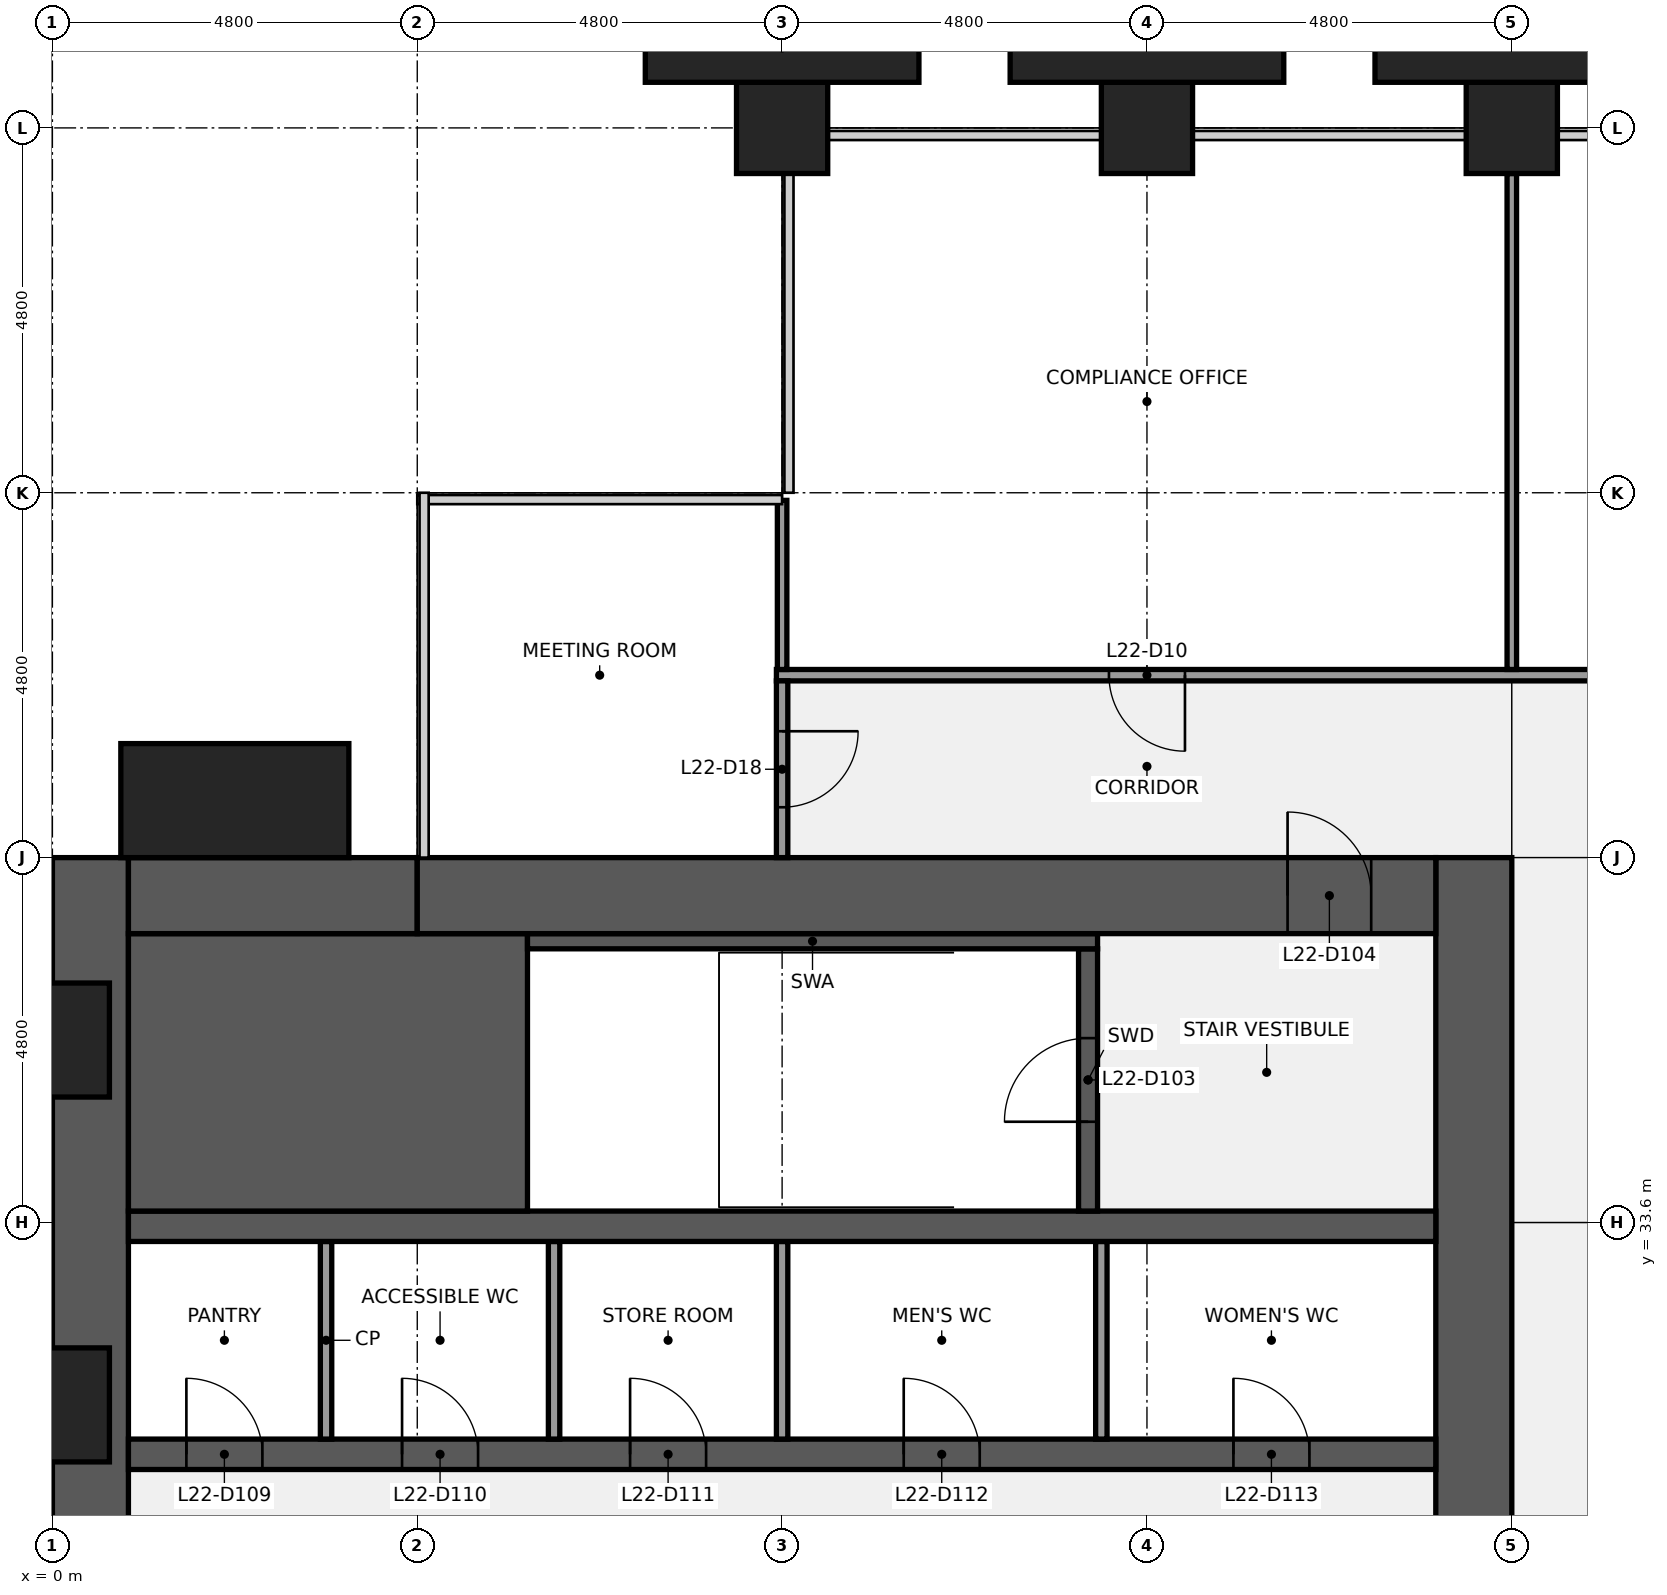
"""IFC4 building model, lengths in metres.
Left out: names, types, materials, properties, quantities, classifications, styles, units other than length and angle.
Written with IfcOpenShell. Run it as: python <this file> out.ifc"""

import sys

from ifc_helpers import new_model, si_unit, direction, frame, frame_2d, origin, origin_2d, place, context, subcontext, project, spatial, rectangle, extrude, element, fill, save


model = new_model("IFC4")
c1 = context("Model", 3, precision=1e-05, world=origin(), true_north=direction((0.0, 1.0)))
c2 = subcontext(c1, "Body", "Model", "MODEL_VIEW")
j1 = project(units=[si_unit("LENGTHUNIT", "METRE"), si_unit("PLANEANGLEUNIT", "RADIAN")], contexts=[c1])
p1 = place(None, origin())
s1 = spatial("IfcSite", under=j1, at=p1, CompositionType="ELEMENT")
p2 = place(p1, origin())
s2 = spatial("IfcBuilding", under=s1, at=p2, CompositionType="ELEMENT")
p3 = place(p2, frame((0.0, 0.0, 108.1)))
s3 = spatial("IfcBuildingStorey", under=s2, at=p3, CompositionType="ELEMENT", Elevation=108.1)
for number, where, z_axis, x_axis in (
    (1, (9.6, 48.0, 0.0), (0.0, 0.0, 1.0), (1.0, 0.0, 0.0)),
    (2, (14.4, 48.0, 0.0), (0.0, 0.0, 1.0), (1.0, 0.0, 0.0)),
    (3, (19.2, 48.0, 0.0), (0.0, 0.0, 1.0), (1.0, 0.0, 0.0)),
):
    element("IfcColumn", number, at=place(p3, frame(where, z_axis=z_axis, x_axis=x_axis)), inside=s3, PredefinedType="COLUMN", context=c2, shape_type="SweptSolid", body=[
        extrude(rectangle(XDim=1.2, YDim=1.2, at=origin_2d()), origin(), (0.0, 0.0, 1.0), 4.0),
    ])
p4 = place(p3, frame((0.5, 9.6, 0.0), z_axis=(0.0, 0.0, 1.0), x_axis=(0.0, 1.0, 0.0)))
e4 = element("IfcWall", 4, at=p4, inside=s3, PredefinedType="SHEAR", context=c2, shape_type="SweptSolid", body=[
    extrude(rectangle(XDim=28.8, YDim=1.0, at=frame_2d((14.4, 0.0))), origin(), (0.0, 0.0, 1.0), 3.84),
])
p5 = place(p4, frame((8.85, 0.0, 0.9)))
e5 = element("IfcOpeningElement", 5, at=p5, cuts=e4, PredefinedType="OPENING", context=c2, shape_type="SweptSolid", body=[
    extrude(rectangle(XDim=1.5, YDim=1.5, at=frame_2d((0.75, 0.75))), frame((0.0, 0.51, 0.0), z_axis=(0.0, -1.0, 0.0), x_axis=(1.0, 0.0, 0.0)), (0.0, 0.0, 1.0), 1.02),
])
p6 = place(p4, frame((18.45, 0.0, 0.9)))
e6 = element("IfcOpeningElement", 6, at=p6, cuts=e4, PredefinedType="OPENING", context=c2, shape_type="SweptSolid", body=[
    extrude(rectangle(XDim=1.5, YDim=1.5, at=frame_2d((0.75, 0.75))), frame((0.0, 0.51, 0.0), z_axis=(0.0, -1.0, 0.0), x_axis=(1.0, 0.0, 0.0)), (0.0, 0.0, 1.0), 1.02),
])
p7 = place(p3, frame((18.7, 38.4, 0.0), z_axis=(0.0, 0.0, 1.0), x_axis=(0.0, -1.0, 0.0)))
e7 = element("IfcWall", 7, at=p7, inside=s3, PredefinedType="SHEAR", context=c2, shape_type="SweptSolid", body=[
    extrude(rectangle(XDim=28.8, YDim=1.0, at=frame_2d((14.4, 0.0))), origin(), (0.0, 0.0, 1.0), 3.84),
])
p8 = place(p7, frame((18.3, 0.0, 0.0)))
e8 = element("IfcOpeningElement", 8, at=p8, cuts=e7, PredefinedType="OPENING", context=c2, shape_type="SweptSolid", body=[
    extrude(rectangle(XDim=1.8, YDim=2.1, at=frame_2d((0.9, 1.05))), frame((0.0, 0.51, 0.0), z_axis=(0.0, -1.0, 0.0), x_axis=(1.0, 0.0, 0.0)), (0.0, 0.0, 1.0), 1.02),
])
p9 = place(p7, frame((8.7, 0.0, 0.0)))
e9 = element("IfcOpeningElement", 9, at=p9, cuts=e7, PredefinedType="OPENING", context=c2, shape_type="SweptSolid", body=[
    extrude(rectangle(XDim=1.8, YDim=2.1, at=frame_2d((0.9, 1.05))), frame((0.0, 0.51, 0.0), z_axis=(0.0, -1.0, 0.0), x_axis=(1.0, 0.0, 0.0)), (0.0, 0.0, 1.0), 1.02),
])
p10 = place(p3, frame((1.0, 30.55, 0.0), z_axis=(0.0, 0.0, 1.0), x_axis=(1.0, 0.0, 0.0)))
e10 = element("IfcWall", 10, at=p10, inside=s3, PredefinedType="SHEAR", context=c2, shape_type="SweptSolid", body=[
    extrude(rectangle(XDim=17.2, YDim=0.4, at=frame_2d((8.6, 0.0))), origin(), (0.0, 0.0, 1.0), 3.84),
])
p11 = place(p10, frame((0.762, 0.0, 0.0)))
e11 = element("IfcOpeningElement", 11, at=p11, cuts=e10, PredefinedType="OPENING", context=c2, shape_type="SweptSolid", body=[
    extrude(rectangle(XDim=1.0, YDim=2.1, at=frame_2d((0.5, 1.05))), frame((0.0, 0.21, 0.0), z_axis=(0.0, -1.0, 0.0), x_axis=(1.0, 0.0, 0.0)), (0.0, 0.0, 1.0), 0.42),
])
p12 = place(p10, frame((3.6, 0.0, 0.0)))
e12 = element("IfcOpeningElement", 12, at=p12, cuts=e10, PredefinedType="OPENING", context=c2, shape_type="SweptSolid", body=[
    extrude(rectangle(XDim=1.0, YDim=2.1, at=frame_2d((0.5, 1.05))), frame((0.0, 0.21, 0.0), z_axis=(0.0, -1.0, 0.0), x_axis=(1.0, 0.0, 0.0)), (0.0, 0.0, 1.0), 0.42),
])
p13 = place(p10, frame((6.6, 0.0, 0.0)))
e13 = element("IfcOpeningElement", 13, at=p13, cuts=e10, PredefinedType="OPENING", context=c2, shape_type="SweptSolid", body=[
    extrude(rectangle(XDim=1.0, YDim=2.1, at=frame_2d((0.5, 1.05))), frame((0.0, 0.21, 0.0), z_axis=(0.0, -1.0, 0.0), x_axis=(1.0, 0.0, 0.0)), (0.0, 0.0, 1.0), 0.42),
])
p14 = place(p10, frame((10.2, 0.0, 0.0)))
e14 = element("IfcOpeningElement", 14, at=p14, cuts=e10, PredefinedType="OPENING", context=c2, shape_type="SweptSolid", body=[
    extrude(rectangle(XDim=1.0, YDim=2.1, at=frame_2d((0.5, 1.05))), frame((0.0, 0.21, 0.0), z_axis=(0.0, -1.0, 0.0), x_axis=(1.0, 0.0, 0.0)), (0.0, 0.0, 1.0), 0.42),
])
p15 = place(p10, frame((14.538, 0.0, 0.0)))
e15 = element("IfcOpeningElement", 15, at=p15, cuts=e10, PredefinedType="OPENING", context=c2, shape_type="SweptSolid", body=[
    extrude(rectangle(XDim=1.0, YDim=2.1, at=frame_2d((0.5, 1.05))), frame((0.0, 0.21, 0.0), z_axis=(0.0, -1.0, 0.0), x_axis=(1.0, 0.0, 0.0)), (0.0, 0.0, 1.0), 0.42),
])
for number, where, z_axis, x_axis in (
    (16, (3.6, 30.75, 0.0), (0.0, 0.0, 1.0), (0.0, 1.0, 0.0)),
    (17, (6.6, 30.75, 0.0), (0.0, 0.0, 1.0), (0.0, 1.0, 0.0)),
    (18, (9.6, 30.75, 0.0), (0.0, 0.0, 1.0), (0.0, 1.0, 0.0)),
    (19, (13.8, 30.75, 0.0), (0.0, 0.0, 1.0), (0.0, 1.0, 0.0)),
):
    element("IfcWall", number, at=place(p3, frame(where, z_axis=z_axis, x_axis=x_axis)), inside=s3, PredefinedType="PARTITIONING", context=c2, shape_type="SweptSolid", body=[
        extrude(rectangle(XDim=2.6, YDim=0.15, at=frame_2d((1.3, 0.0))), origin(), (0.0, 0.0, 1.0), 3.84),
    ])
p16 = place(p3, frame((1.0, 33.55, 0.0), z_axis=(0.0, 0.0, 1.0), x_axis=(1.0, 0.0, 0.0)))
e20 = element("IfcWall", 20, at=p16, inside=s3, PredefinedType="SHEAR", context=c2, shape_type="SweptSolid", body=[
    extrude(rectangle(XDim=17.2, YDim=0.4, at=frame_2d((8.6, 0.0))), origin(), (0.0, 0.0, 1.0), 3.84),
])
p17 = place(p3, frame((1.0, 35.575, 0.0), z_axis=(0.0, 0.0, 1.0), x_axis=(1.0, 0.0, 0.0)))
e21 = element("IfcWall", 21, at=p17, inside=s3, PredefinedType="SHEAR", context=c2, shape_type="SweptSolid", body=[
    extrude(rectangle(XDim=5.25, YDim=3.65, at=frame_2d((2.625, 0.0))), origin(), (0.0, 0.0, 1.0), 3.84),
])
p18 = place(p3, frame((13.625, 33.75, 0.0), z_axis=(0.0, 0.0, 1.0), x_axis=(0.0, 1.0, 0.0)))
e22 = element("IfcWall", 22, at=p18, inside=s3, PredefinedType="SHEAR", context=c2, shape_type="SweptSolid", body=[
    extrude(rectangle(XDim=3.45, YDim=0.25, at=frame_2d((1.725, 0.0))), origin(), (0.0, 0.0, 1.0), 3.84),
])
p19 = place(p18, frame((1.175, 0.0, 0.0)))
e23 = element("IfcOpeningElement", 23, at=p19, cuts=e22, PredefinedType="OPENING", context=c2, shape_type="SweptSolid", body=[
    extrude(rectangle(XDim=1.1, YDim=2.1, at=frame_2d((0.55, 1.05))), frame((0.0, 0.135, 0.0), z_axis=(0.0, -1.0, 0.0), x_axis=(1.0, 0.0, 0.0)), (0.0, 0.0, 1.0), 0.27),
])
p20 = place(p3, frame((6.25, 37.3, 0.0), z_axis=(0.0, 0.0, 1.0), x_axis=(1.0, 0.0, 0.0)))
e24 = element("IfcWall", 24, at=p20, inside=s3, PredefinedType="SHEAR", context=c2, shape_type="SweptSolid", body=[
    extrude(rectangle(XDim=7.5, YDim=0.2, at=frame_2d((3.75, 0.0))), origin(), (0.0, 0.0, 1.0), 3.84),
])
p21 = place(p3, frame((1.0, 37.9, 0.0), z_axis=(0.0, 0.0, 1.0), x_axis=(1.0, 0.0, 0.0)))
e25 = element("IfcWall", 25, at=p21, inside=s3, PredefinedType="SHEAR", context=c2, shape_type="SweptSolid", body=[
    extrude(rectangle(XDim=3.8, YDim=1.0, at=frame_2d((1.9, 0.0))), origin(), (0.0, 0.0, 1.0), 3.84),
])
p22 = place(p3, frame((4.8, 37.9, 0.0), z_axis=(0.0, 0.0, 1.0), x_axis=(1.0, 0.0, 0.0)))
e26 = element("IfcWall", 26, at=p22, inside=s3, PredefinedType="SHEAR", context=c2, shape_type="SweptSolid", body=[
    extrude(rectangle(XDim=13.4, YDim=1.0, at=frame_2d((6.7, 0.0))), origin(), (0.0, 0.0, 1.0), 3.84),
])
p23 = place(p22, frame((11.45, 0.0, 0.0)))
e27 = element("IfcOpeningElement", 27, at=p23, cuts=e26, PredefinedType="OPENING", context=c2, shape_type="SweptSolid", body=[
    extrude(rectangle(XDim=1.1, YDim=2.1, at=frame_2d((0.55, 1.05))), frame((0.0, 0.51, 0.0), z_axis=(0.0, -1.0, 0.0), x_axis=(1.0, 0.0, 0.0)), (0.0, 0.0, 1.0), 1.02),
])
p24 = place(p3, frame((9.525, 40.8, 0.0), z_axis=(0.0, 0.0, 1.0), x_axis=(1.0, 0.0, 0.0)))
e28 = element("IfcWall", 28, at=p24, inside=s3, PredefinedType="PARTITIONING", context=c2, shape_type="SweptSolid", body=[
    extrude(rectangle(XDim=38.55, YDim=0.15, at=frame_2d((19.275, 0.0))), origin(), (0.0, 0.0, 1.0), 2.936),
])
p25 = place(p24, frame((4.375, 0.0, 0.0)))
e29 = element("IfcOpeningElement", 29, at=p25, cuts=e28, PredefinedType="OPENING", context=c2, shape_type="SweptSolid", body=[
    extrude(rectangle(XDim=1.0, YDim=2.1, at=frame_2d((0.5, 1.05))), frame((0.0, 0.085, 0.0), z_axis=(0.0, -1.0, 0.0), x_axis=(1.0, 0.0, 0.0)), (0.0, 0.0, 1.0), 0.17),
])
p26 = place(p24, frame((13.975, 0.0, 0.0)))
e30 = element("IfcOpeningElement", 30, at=p26, cuts=e28, PredefinedType="OPENING", context=c2, shape_type="SweptSolid", body=[
    extrude(rectangle(XDim=1.0, YDim=2.1, at=frame_2d((0.5, 1.05))), frame((0.0, 0.085, 0.0), z_axis=(0.0, -1.0, 0.0), x_axis=(1.0, 0.0, 0.0)), (0.0, 0.0, 1.0), 0.17),
])
p27 = place(p24, frame((19.975, 0.0, 0.0)))
e31 = element("IfcOpeningElement", 31, at=p27, cuts=e28, PredefinedType="OPENING", context=c2, shape_type="SweptSolid", body=[
    extrude(rectangle(XDim=1.0, YDim=2.1, at=frame_2d((0.5, 1.05))), frame((0.0, 0.085, 0.0), z_axis=(0.0, -1.0, 0.0), x_axis=(1.0, 0.0, 0.0)), (0.0, 0.0, 1.0), 0.17),
])
p28 = place(p24, frame((24.775, 0.0, 0.0)))
e32 = element("IfcOpeningElement", 32, at=p28, cuts=e28, PredefinedType="OPENING", context=c2, shape_type="SweptSolid", body=[
    extrude(rectangle(XDim=1.0, YDim=2.1, at=frame_2d((0.5, 1.05))), frame((0.0, 0.085, 0.0), z_axis=(0.0, -1.0, 0.0), x_axis=(1.0, 0.0, 0.0)), (0.0, 0.0, 1.0), 0.17),
])
p29 = place(p24, frame((33.175, 0.0, 0.0)))
e33 = element("IfcOpeningElement", 33, at=p29, cuts=e28, PredefinedType="OPENING", context=c2, shape_type="SweptSolid", body=[
    extrude(rectangle(XDim=1.0, YDim=2.1, at=frame_2d((0.5, 1.05))), frame((0.0, 0.085, 0.0), z_axis=(0.0, -1.0, 0.0), x_axis=(1.0, 0.0, 0.0)), (0.0, 0.0, 1.0), 0.17),
])
p30 = place(p3, frame((9.6, 40.875, 0.0), z_axis=(0.0, 0.0, 1.0), x_axis=(0.0, 1.0, 0.0)))
e34 = element("IfcWall", 34, at=p30, inside=s3, PredefinedType="PARTITIONING", context=c2, shape_type="SweptSolid", body=[
    extrude(rectangle(XDim=2.225, YDim=0.125, at=frame_2d((1.113, 0.0))), origin(), (0.0, 0.0, 1.0), 2.936),
])
p31 = place(p3, frame((9.6, 38.4, 0.0), z_axis=(0.0, 0.0, 1.0), x_axis=(0.0, 1.0, 0.0)))
e35 = element("IfcWall", 35, at=p31, inside=s3, PredefinedType="PARTITIONING", context=c2, shape_type="SweptSolid", body=[
    extrude(rectangle(XDim=2.325, YDim=0.15, at=frame_2d((1.163, 0.0))), origin(), (0.0, 0.0, 1.0), 2.936),
])
p32 = place(p31, frame((0.663, 0.0, 0.0)))
e36 = element("IfcOpeningElement", 36, at=p32, cuts=e35, PredefinedType="OPENING", context=c2, shape_type="SweptSolid", body=[
    extrude(rectangle(XDim=1.0, YDim=2.1, at=frame_2d((0.5, 1.05))), frame((0.0, 0.085, 0.0), z_axis=(0.0, -1.0, 0.0), x_axis=(1.0, 0.0, 0.0)), (0.0, 0.0, 1.0), 0.17),
])
p33 = place(p3, frame((19.2, 40.875, 0.0), z_axis=(0.0, 0.0, 1.0), x_axis=(0.0, 1.0, 0.0)))
e37 = element("IfcWall", 37, at=p33, inside=s3, PredefinedType="PARTITIONING", context=c2, shape_type="SweptSolid", body=[
    extrude(rectangle(XDim=6.525, YDim=0.125, at=frame_2d((3.262, 0.0))), origin(), (0.0, 0.0, 1.0), 2.936),
])
p34 = place(p3, frame((2.4, 39.15, 0.0), z_axis=(0.0, 0.0, 1.0), x_axis=(1.0, 0.0, 0.0)))
e38 = element("IfcColumn", 38, at=p34, inside=s3, PredefinedType="PILASTER", context=c2, shape_type="SweptSolid", body=[
    extrude(rectangle(XDim=3.0, YDim=1.5, at=origin_2d()), origin(), (0.0, 0.0, 1.0), 4.0),
])
for number, where, z_axis, x_axis in (
    (39, (9.6, 49.05, 0.0), (0.0, 0.0, 1.0), (1.0, 0.0, 0.0)),
    (40, (14.4, 49.05, 0.0), (0.0, 0.0, 1.0), (1.0, 0.0, 0.0)),
    (41, (19.2, 49.05, 0.0), (0.0, 0.0, 1.0), (1.0, 0.0, 0.0)),
):
    element("IfcColumn", number, at=place(p3, frame(where, z_axis=z_axis, x_axis=x_axis)), inside=s3, PredefinedType="PILASTER", context=c2, shape_type="SweptSolid", body=[
        extrude(rectangle(XDim=3.6, YDim=0.9, at=origin_2d()), origin(), (0.0, 0.0, 1.0), 4.0),
    ])
p35 = place(p19, origin())
e42 = element("IfcDoor", 42, at=p35, inside=s3, OperationType="SINGLE_SWING_LEFT", PredefinedType="DOOR", context=c2, shape_type="SweptSolid", body=[
    extrude(rectangle(XDim=1.1, YDim=2.1, at=frame_2d((0.55, 1.05))), frame((0.0, 0.025, 0.0), z_axis=(0.0, -1.0, 0.0), x_axis=(1.0, 0.0, 0.0)), (0.0, 0.0, 1.0), 0.05),
])
fill(e23, e42)
p36 = place(p23, origin())
e43 = element("IfcDoor", 43, at=p36, inside=s3, OperationType="SINGLE_SWING_LEFT", PredefinedType="DOOR", context=c2, shape_type="SweptSolid", body=[
    extrude(rectangle(XDim=1.1, YDim=2.1, at=frame_2d((0.55, 1.05))), frame((0.0, 0.025, 0.0), z_axis=(0.0, -1.0, 0.0), x_axis=(1.0, 0.0, 0.0)), (0.0, 0.0, 1.0), 0.05),
])
fill(e27, e43)
p37 = place(p11, origin())
e44 = element("IfcDoor", 44, at=p37, inside=s3, OperationType="SINGLE_SWING_LEFT", PredefinedType="DOOR", context=c2, shape_type="SweptSolid", body=[
    extrude(rectangle(XDim=1.0, YDim=2.1, at=frame_2d((0.5, 1.05))), frame((0.0, 0.025, 0.0), z_axis=(0.0, -1.0, 0.0), x_axis=(1.0, 0.0, 0.0)), (0.0, 0.0, 1.0), 0.05),
])
fill(e11, e44)
p38 = place(p12, origin())
e45 = element("IfcDoor", 45, at=p38, inside=s3, OperationType="SINGLE_SWING_LEFT", PredefinedType="DOOR", context=c2, shape_type="SweptSolid", body=[
    extrude(rectangle(XDim=1.0, YDim=2.1, at=frame_2d((0.5, 1.05))), frame((0.0, 0.025, 0.0), z_axis=(0.0, -1.0, 0.0), x_axis=(1.0, 0.0, 0.0)), (0.0, 0.0, 1.0), 0.05),
])
fill(e12, e45)
p39 = place(p13, origin())
e46 = element("IfcDoor", 46, at=p39, inside=s3, OperationType="SINGLE_SWING_LEFT", PredefinedType="DOOR", context=c2, shape_type="SweptSolid", body=[
    extrude(rectangle(XDim=1.0, YDim=2.1, at=frame_2d((0.5, 1.05))), frame((0.0, 0.025, 0.0), z_axis=(0.0, -1.0, 0.0), x_axis=(1.0, 0.0, 0.0)), (0.0, 0.0, 1.0), 0.05),
])
fill(e13, e46)
p40 = place(p14, origin())
e47 = element("IfcDoor", 47, at=p40, inside=s3, OperationType="SINGLE_SWING_LEFT", PredefinedType="DOOR", context=c2, shape_type="SweptSolid", body=[
    extrude(rectangle(XDim=1.0, YDim=2.1, at=frame_2d((0.5, 1.05))), frame((0.0, 0.025, 0.0), z_axis=(0.0, -1.0, 0.0), x_axis=(1.0, 0.0, 0.0)), (0.0, 0.0, 1.0), 0.05),
])
fill(e14, e47)
p41 = place(p15, origin())
e48 = element("IfcDoor", 48, at=p41, inside=s3, OperationType="SINGLE_SWING_LEFT", PredefinedType="DOOR", context=c2, shape_type="SweptSolid", body=[
    extrude(rectangle(XDim=1.0, YDim=2.1, at=frame_2d((0.5, 1.05))), frame((0.0, 0.025, 0.0), z_axis=(0.0, -1.0, 0.0), x_axis=(1.0, 0.0, 0.0)), (0.0, 0.0, 1.0), 0.05),
])
fill(e15, e48)
p42 = place(p25, origin())
e49 = element("IfcDoor", 49, at=p42, inside=s3, OperationType="SINGLE_SWING_RIGHT", PredefinedType="DOOR", context=c2, shape_type="SweptSolid", body=[
    extrude(rectangle(XDim=1.0, YDim=2.1, at=frame_2d((0.5, 1.05))), frame((0.0, 0.025, 0.0), z_axis=(0.0, -1.0, 0.0), x_axis=(1.0, 0.0, 0.0)), (0.0, 0.0, 1.0), 0.05),
])
fill(e29, e49)
p43 = place(p32, origin())
e50 = element("IfcDoor", 50, at=p43, inside=s3, OperationType="SINGLE_SWING_RIGHT", PredefinedType="DOOR", context=c2, shape_type="SweptSolid", body=[
    extrude(rectangle(XDim=1.0, YDim=2.1, at=frame_2d((0.5, 1.05))), frame((0.0, 0.025, 0.0), z_axis=(0.0, -1.0, 0.0), x_axis=(1.0, 0.0, 0.0)), (0.0, 0.0, 1.0), 0.05),
])
fill(e36, e50)
save(model, sys.argv[1])
